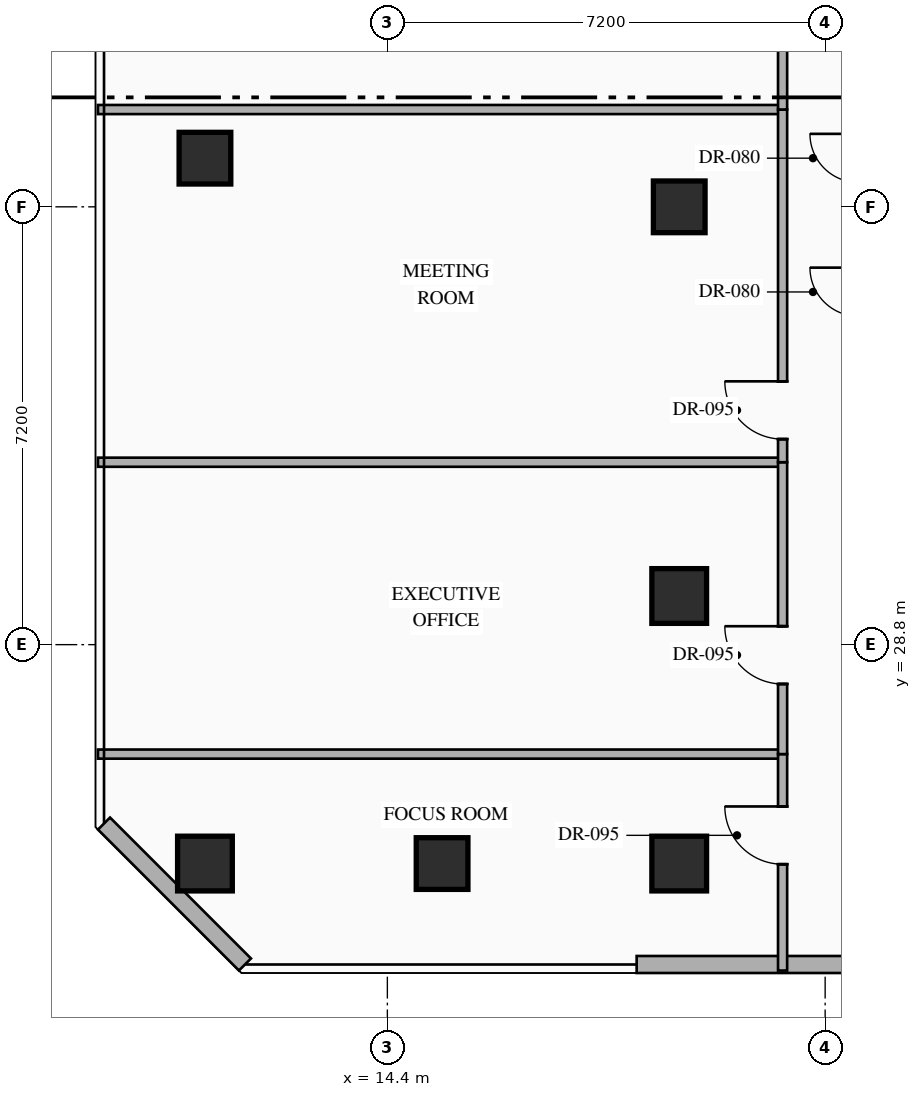
"""IFC4 building model, lengths in metres.
Left out: names, types, materials, properties, quantities, classifications, styles, units other than length and angle.
Written with IfcOpenShell. Run it as: python <this file> out.ifc"""

import sys

from ifc_helpers import new_model, si_unit, direction, frame, frame_2d, origin, origin_2d, place, context, subcontext, project, spatial, rectangle, hollow_rectangle, extrude, element, fill, save


model = new_model("IFC4")
c1 = context("Model", 3, precision=1e-05, world=origin(), true_north=direction((0.0, 1.0)))
c2 = subcontext(c1, "Body", "Model", "MODEL_VIEW")
j1 = project(units=[si_unit("LENGTHUNIT", "METRE"), si_unit("PLANEANGLEUNIT", "RADIAN")], contexts=[c1])
p1 = place(None, origin())
s1 = spatial("IfcSite", under=j1, at=p1, CompositionType="ELEMENT")
p2 = place(p1, origin())
s2 = spatial("IfcBuilding", under=s1, at=p2, CompositionType="ELEMENT")
p3 = place(p2, frame((0.0, 0.0, 112.05)))
s3 = spatial("IfcBuildingStorey", under=s2, at=p3, CompositionType="ELEMENT", Elevation=112.05)
for number, where, z_axis, x_axis in (
    (1, (11.4, 25.2, 0.0), (0.0, 0.0, 1.0), (1.0, 0.0, 0.0)),
    (2, (19.2, 25.2, 0.0), (0.0, 0.0, 1.0), (1.0, 0.0, 0.0)),
    (3, (19.2, 29.6, 0.0), (0.0, 0.0, 1.0), (1.0, 0.0, 0.0)),
):
    element("IfcColumn", number, at=place(p3, frame(where, z_axis=z_axis, x_axis=x_axis)), inside=s3, PredefinedType="COLUMN", context=c2, shape_type="SweptSolid", body=[
        extrude(hollow_rectangle(XDim=0.9, YDim=0.9, WallThickness=0.036, at=origin_2d()), origin(), (0.0, 0.0, 1.0), 3.6),
    ])
for number, where, z_axis, x_axis in (
    (4, (11.4, 36.8, 0.0), (0.0, 0.0, 1.0), (1.0, 0.0, 0.0)),
    (5, (19.2, 36.0, 0.0), (0.0, 0.0, 1.0), (1.0, 0.0, 0.0)),
    (6, (15.3, 25.2, 0.0), (0.0, 0.0, 1.0), (1.0, 0.0, 0.0)),
):
    element("IfcColumn", number, at=place(p3, frame(where, z_axis=z_axis, x_axis=x_axis)), inside=s3, PredefinedType="COLUMN", context=c2, shape_type="SweptSolid", body=[
        extrude(hollow_rectangle(XDim=0.85, YDim=0.85, WallThickness=0.032, at=origin_2d()), origin(), (0.0, 0.0, 1.0), 3.6),
    ])
p4 = place(p3, frame((25.247, 23.54, 0.0), z_axis=(0.0, 0.0, 1.0), x_axis=(-1.0, 0.0, 0.0)))
e7 = element("IfcWall", 7, at=p4, inside=s3, PredefinedType="STANDARD", context=c2, shape_type="SweptSolid", body=[
    extrude(rectangle(XDim=6.747, YDim=0.28, at=frame_2d((3.374, 0.0))), origin(), (0.0, 0.0, 1.0), 3.35),
])
p5 = place(p3, frame((12.058, 23.54, 0.0), z_axis=(0.0, 0.0, 1.0), x_axis=(-0.707144017911, 0.707069542501, 0.0)))
e8 = element("IfcWall", 8, at=p5, inside=s3, PredefinedType="STANDARD", context=c2, shape_type="SweptSolid", body=[
    extrude(rectangle(XDim=3.278, YDim=0.28, at=frame_2d((1.639, 0.0))), origin(), (0.0, 0.0, 1.0), 3.35),
])
p6 = place(p3, frame((9.64, 27.0, 0.0), z_axis=(0.0, 0.0, 1.0), x_axis=(1.0, 0.0, 0.0)))
e9 = element("IfcWall", 9, at=p6, inside=s3, PredefinedType="PARTITIONING", context=c2, shape_type="SweptSolid", body=[
    extrude(rectangle(XDim=11.26, YDim=0.15, at=frame_2d((5.63, 0.0))), origin(), (0.0, 0.0, 1.0), 3.35),
])
p7 = place(p3, frame((20.9, 23.44, 0.0), z_axis=(0.0, 0.0, 1.0), x_axis=(0.0, 1.0, 0.0)))
e10 = element("IfcWall", 10, at=p7, inside=s3, PredefinedType="PARTITIONING", context=c2, shape_type="SweptSolid", body=[
    extrude(rectangle(XDim=3.56, YDim=0.15, at=frame_2d((1.78, 0.0))), origin(), (0.0, 0.0, 1.0), 3.35),
])
p8 = place(p7, frame((1.749, 0.0, 0.0)))
e11 = element("IfcOpeningElement", 11, at=p8, cuts=e10, PredefinedType="OPENING", context=c2, shape_type="SweptSolid", body=[
    extrude(rectangle(XDim=0.95, YDim=2.15, at=frame_2d((0.475, 1.075))), frame((0.0, 0.085, 0.0), z_axis=(0.0, -1.0, 0.0), x_axis=(1.0, 0.0, 0.0)), (0.0, 0.0, 1.0), 0.17),
])
p9 = place(p3, frame((9.64, 31.8, 0.0), z_axis=(0.0, 0.0, 1.0), x_axis=(1.0, 0.0, 0.0)))
e12 = element("IfcWall", 12, at=p9, inside=s3, PredefinedType="PARTITIONING", context=c2, shape_type="SweptSolid", body=[
    extrude(rectangle(XDim=11.26, YDim=0.15, at=frame_2d((5.63, 0.0))), origin(), (0.0, 0.0, 1.0), 3.35),
])
p10 = place(p3, frame((20.9, 27.0, 0.0), z_axis=(0.0, 0.0, 1.0), x_axis=(0.0, 1.0, 0.0)))
e13 = element("IfcWall", 13, at=p10, inside=s3, PredefinedType="PARTITIONING", context=c2, shape_type="SweptSolid", body=[
    extrude(rectangle(XDim=4.8, YDim=0.15, at=frame_2d((2.4, 0.0))), origin(), (0.0, 0.0, 1.0), 3.35),
])
p11 = place(p10, frame((1.153, 0.0, 0.0)))
e14 = element("IfcOpeningElement", 14, at=p11, cuts=e13, PredefinedType="OPENING", context=c2, shape_type="SweptSolid", body=[
    extrude(rectangle(XDim=0.95, YDim=2.15, at=frame_2d((0.475, 1.075))), frame((0.0, 0.085, 0.0), z_axis=(0.0, -1.0, 0.0), x_axis=(1.0, 0.0, 0.0)), (0.0, 0.0, 1.0), 0.17),
])
p12 = place(p3, frame((9.64, 37.6, 0.0), z_axis=(0.0, 0.0, 1.0), x_axis=(1.0, 0.0, 0.0)))
e15 = element("IfcWall", 15, at=p12, inside=s3, PredefinedType="PARTITIONING", context=c2, shape_type="SweptSolid", body=[
    extrude(rectangle(XDim=11.26, YDim=0.15, at=frame_2d((5.63, 0.0))), origin(), (0.0, 0.0, 1.0), 3.35),
])
p13 = place(p3, frame((20.9, 31.8, 0.0), z_axis=(0.0, 0.0, 1.0), x_axis=(0.0, 1.0, 0.0)))
e16 = element("IfcWall", 16, at=p13, inside=s3, PredefinedType="PARTITIONING", context=c2, shape_type="SweptSolid", body=[
    extrude(rectangle(XDim=5.8, YDim=0.15, at=frame_2d((2.9, 0.0))), origin(), (0.0, 0.0, 1.0), 3.35),
])
p14 = place(p13, frame((0.38, 0.0, 0.0)))
e17 = element("IfcOpeningElement", 17, at=p14, cuts=e16, PredefinedType="OPENING", context=c2, shape_type="SweptSolid", body=[
    extrude(rectangle(XDim=0.95, YDim=2.15, at=frame_2d((0.475, 1.075))), frame((0.0, 0.085, 0.0), z_axis=(0.0, -1.0, 0.0), x_axis=(1.0, 0.0, 0.0)), (0.0, 0.0, 1.0), 0.17),
])
p15 = place(p3, frame((20.9, 37.6, 0.0), z_axis=(0.0, 0.0, 1.0), x_axis=(0.0, 1.0, 0.0)))
e18 = element("IfcWall", 18, at=p15, inside=s3, PredefinedType="PARTITIONING", context=c2, shape_type="SweptSolid", body=[
    extrude(rectangle(XDim=6.6, YDim=0.15, at=frame_2d((3.3, 0.0))), origin(), (0.0, 0.0, 1.0), 3.35),
])
p16 = place(p15, frame((3.314, 0.0, 0.0)))
e19 = element("IfcOpeningElement", 19, at=p16, cuts=e18, PredefinedType="OPENING", context=c2, shape_type="SweptSolid", body=[
    extrude(rectangle(XDim=0.95, YDim=2.15, at=frame_2d((0.475, 1.075))), frame((0.0, 0.085, 0.0), z_axis=(0.0, -1.0, 0.0), x_axis=(1.0, 0.0, 0.0)), (0.0, 0.0, 1.0), 0.17),
])
p17 = place(p8, origin())
e20 = element("IfcDoor", 20, at=p17, inside=s3, OperationType="SINGLE_SWING_RIGHT", PredefinedType="DOOR", context=c2, shape_type="SweptSolid", body=[
    extrude(rectangle(XDim=0.95, YDim=2.15, at=frame_2d((0.475, 1.075))), frame((0.0, 0.025, 0.0), z_axis=(0.0, -1.0, 0.0), x_axis=(1.0, 0.0, 0.0)), (0.0, 0.0, 1.0), 0.05),
])
fill(e11, e20)
p18 = place(p11, origin())
e21 = element("IfcDoor", 21, at=p18, inside=s3, OperationType="SINGLE_SWING_RIGHT", PredefinedType="DOOR", context=c2, shape_type="SweptSolid", body=[
    extrude(rectangle(XDim=0.95, YDim=2.15, at=frame_2d((0.475, 1.075))), frame((0.0, 0.025, 0.0), z_axis=(0.0, -1.0, 0.0), x_axis=(1.0, 0.0, 0.0)), (0.0, 0.0, 1.0), 0.05),
])
fill(e14, e21)
p19 = place(p14, origin())
e22 = element("IfcDoor", 22, at=p19, inside=s3, OperationType="SINGLE_SWING_RIGHT", PredefinedType="DOOR", context=c2, shape_type="SweptSolid", body=[
    extrude(rectangle(XDim=0.95, YDim=2.15, at=frame_2d((0.475, 1.075))), frame((0.0, 0.025, 0.0), z_axis=(0.0, -1.0, 0.0), x_axis=(1.0, 0.0, 0.0)), (0.0, 0.0, 1.0), 0.05),
])
fill(e17, e22)
save(model, sys.argv[1])
